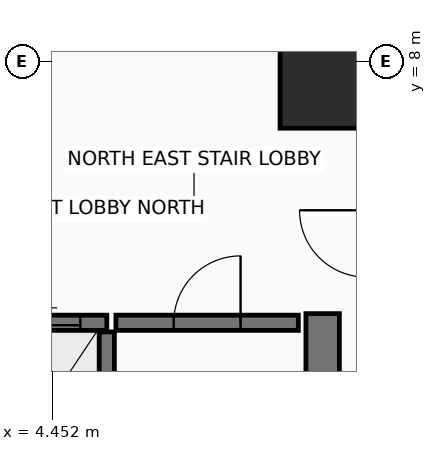
"""IFC4 building model, lengths in metres.
Left out: names, types, materials, properties, quantities, classifications, styles, units other than length and angle.
Written with IfcOpenShell. Run it as: python <this file> out.ifc"""

import sys

from ifc_helpers import new_model, si_unit, direction, frame, frame_2d, origin, origin_2d, place, context, subcontext, project, spatial, rectangle, extrude, element, fill, save


model = new_model("IFC4")
c1 = context("Model", 3, precision=1e-05, world=origin(), true_north=direction((0.0, 1.0)))
c2 = subcontext(c1, "Body", "Model", "MODEL_VIEW")
j1 = project(units=[si_unit("LENGTHUNIT", "METRE"), si_unit("PLANEANGLEUNIT", "RADIAN")], contexts=[c1])
p1 = place(None, origin())
s1 = spatial("IfcSite", under=j1, at=p1, CompositionType="ELEMENT")
p2 = place(p1, origin())
s2 = spatial("IfcBuilding", under=s1, at=p2, CompositionType="ELEMENT")
p3 = place(p2, frame((0.0, 0.0, 60.45)))
s3 = spatial("IfcBuildingStorey", under=s2, at=p3, CompositionType="ELEMENT", Elevation=60.45)
p4 = place(p3, frame((8.9, 7.6, 0.0), z_axis=(0.0, 0.0, 1.0), x_axis=(1.0, 0.0, 0.0)))
e1 = element("IfcColumn", 1, at=p4, inside=s3, PredefinedType="COLUMN", context=c2, shape_type="SweptSolid", body=[
    extrude(rectangle(XDim=1.4, YDim=1.4, at=origin_2d()), origin(), (0.0, 0.0, 1.0), 3.4),
])
p5 = place(p3, frame((8.9, -6.85, 0.0), z_axis=(0.0, 0.0, 1.0), x_axis=(0.0, 1.0, 0.0)))
e2 = element("IfcWall", 2, at=p5, inside=s3, PredefinedType="SHEAR", context=c2, shape_type="SweptSolid", body=[
    extrude(rectangle(XDim=10.7, YDim=0.55, at=frame_2d((5.35, 0.0))), origin(), (0.0, 0.0, 1.0), 3.225),
])
p6 = place(p3, frame((5.35, -3.75, 0.0), z_axis=(0.0, 0.0, 1.0), x_axis=(0.0, 1.0, 0.0)))
e3 = element("IfcWall", 3, at=p6, inside=s3, PredefinedType="SHEAR", context=c2, shape_type="SweptSolid", body=[
    extrude(rectangle(XDim=7.3, YDim=0.25, at=frame_2d((3.65, 0.0))), origin(), (0.0, 0.0, 1.0), 3.225),
])
p7 = place(p3, frame((5.5, 3.7, 0.0), z_axis=(0.0, 0.0, 1.0), x_axis=(1.0, 0.0, 0.0)))
e4 = element("IfcWall", 4, at=p7, inside=s3, PredefinedType="SHEAR", context=c2, shape_type="SweptSolid", body=[
    extrude(rectangle(XDim=3.0, YDim=0.25, at=frame_2d((1.5, 0.0))), origin(), (0.0, 0.0, 1.0), 3.225),
])
p8 = place(p7, frame((0.95, 0.0, 0.0)))
e5 = element("IfcOpeningElement", 5, at=p8, cuts=e4, PredefinedType="OPENING", context=c2, shape_type="SweptSolid", body=[
    extrude(rectangle(XDim=1.1, YDim=2.15, at=frame_2d((0.55, 1.075))), frame((0.0, 0.135, 0.0), z_axis=(0.0, -1.0, 0.0), x_axis=(1.0, 0.0, 0.0)), (0.0, 0.0, 1.0), 0.27),
])
p9 = place(p3, frame((3.28, 3.7, 0.0), z_axis=(0.0, 0.0, 1.0), x_axis=(1.0, 0.0, 0.0)))
e6 = element("IfcWall", 6, at=p9, inside=s3, PredefinedType="SHEAR", context=c2, shape_type="SweptSolid", body=[
    extrude(rectangle(XDim=2.07, YDim=0.25, at=frame_2d((1.035, 0.0))), origin(), (0.0, 0.0, 1.0), 3.225),
])
p10 = place(p9, frame((0.435, 0.0, 0.0)))
e7 = element("IfcOpeningElement", 7, at=p10, cuts=e6, PredefinedType="OPENING", context=c2, shape_type="SweptSolid", body=[
    extrude(rectangle(XDim=1.2, YDim=2.2, at=frame_2d((0.6, 1.1))), frame((0.0, 0.135, 0.0), z_axis=(0.0, -1.0, 0.0), x_axis=(1.0, 0.0, 0.0)), (0.0, 0.0, 1.0), 0.27),
])
p11 = place(p8, frame((1.1, 0.0, 0.0), z_axis=(0.0, 0.0, 1.0), x_axis=(-1.0, 0.0, 0.0)))
e8 = element("IfcDoor", 8, at=p11, inside=s3, OperationType="SINGLE_SWING_LEFT", PredefinedType="DOOR", context=c2, shape_type="SweptSolid", body=[
    extrude(rectangle(XDim=1.1, YDim=2.15, at=frame_2d((0.55, 1.075))), frame((0.0, 0.025, 0.0), z_axis=(0.0, -1.0, 0.0), x_axis=(1.0, 0.0, 0.0)), (0.0, 0.0, 1.0), 0.05),
])
fill(e5, e8)
p12 = place(p10, origin())
e9 = element("IfcDoor", 9, at=p12, inside=s3, OperationType="SLIDING_TO_RIGHT", PredefinedType="DOOR", context=c2, shape_type="SweptSolid", body=[
    extrude(rectangle(XDim=1.2, YDim=2.2, at=frame_2d((0.6, 1.1))), frame((0.0, 0.025, 0.0), z_axis=(0.0, -1.0, 0.0), x_axis=(1.0, 0.0, 0.0)), (0.0, 0.0, 1.0), 0.05),
])
fill(e7, e9)
save(model, sys.argv[1])
